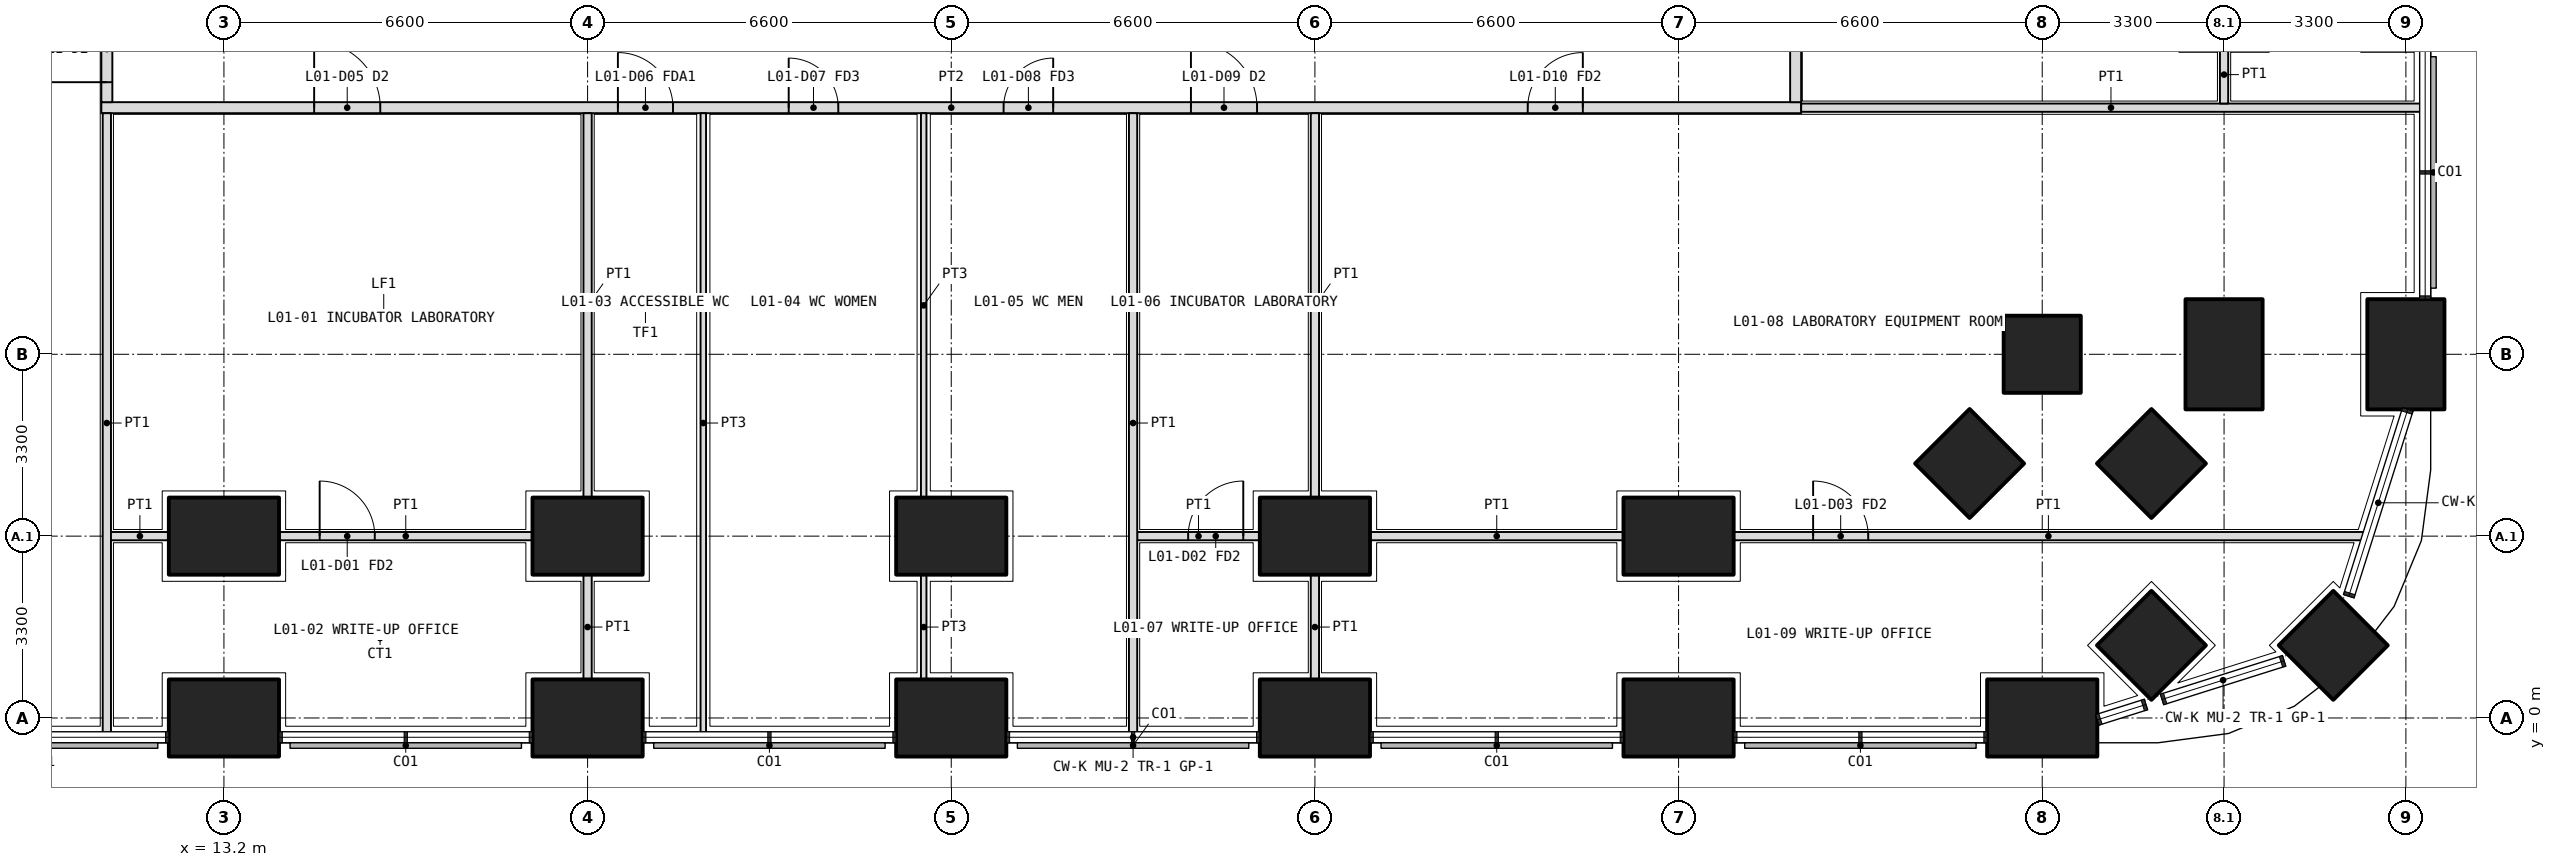
"""IFC4 building model, lengths in metres.
Left out: names, types, materials, properties, quantities, classifications, styles, units other than length and angle.
Written with IfcOpenShell. Run it as: python <this file> out.ifc"""

import sys

from ifc_helpers import new_model, si_unit, direction, frame, frame_2d, origin, origin_2d, place, context, subcontext, project, spatial, rectangle, extrude, element, fill, save


model = new_model("IFC4")
c1 = context("Model", 3, precision=1e-05, world=origin(), true_north=direction((0.0, 1.0)))
c2 = subcontext(c1, "Body", "Model", "MODEL_VIEW")
j1 = project(units=[si_unit("LENGTHUNIT", "METRE"), si_unit("PLANEANGLEUNIT", "RADIAN")], contexts=[c1])
p1 = place(None, origin())
s1 = spatial("IfcSite", under=j1, at=p1, CompositionType="ELEMENT")
p2 = place(p1, origin())
s2 = spatial("IfcBuilding", under=s1, at=p2, CompositionType="ELEMENT")
p3 = place(p2, frame((0.0, 0.0, 7.2)))
s3 = spatial("IfcBuildingStorey", under=s2, at=p3, CompositionType="ELEMENT", Elevation=7.2)
p4 = place(p3, frame((51.482, 1.318, 0.0), z_axis=(0.0, 0.0, 1.0), x_axis=(0.707106781187, 0.707106781187, 0.0)))
e1 = element("IfcColumn", 1, at=p4, inside=s3, PredefinedType="COLUMN", context=c2, shape_type="SweptSolid", body=[
    extrude(rectangle(XDim=1.4, YDim=1.4, at=origin_2d()), origin(), (0.0, 0.0, 1.0), 5.4),
])
for number, where, z_axis, x_axis in (
    (2, (13.2, 0.0, 0.0), (0.0, 0.0, 1.0), (1.0, 0.0, 0.0)),
    (3, (19.8, 0.0, 0.0), (0.0, 0.0, 1.0), (1.0, 0.0, 0.0)),
    (4, (26.4, 0.0, 0.0), (0.0, 0.0, 1.0), (1.0, 0.0, 0.0)),
    (5, (33.0, 0.0, 0.0), (0.0, 0.0, 1.0), (1.0, 0.0, 0.0)),
    (6, (39.6, 0.0, 0.0), (0.0, 0.0, 1.0), (1.0, 0.0, 0.0)),
    (7, (46.2, 0.0, 0.0), (0.0, 0.0, 1.0), (1.0, 0.0, 0.0)),
    (8, (52.8, 6.6, 0.0), (0.0, 0.0, 1.0), (0.0, 1.0, 0.0)),
):
    element("IfcColumn", number, at=place(p3, frame(where, z_axis=z_axis, x_axis=x_axis)), inside=s3, PredefinedType="COLUMN", context=c2, shape_type="SweptSolid", body=[
        extrude(rectangle(XDim=2.0, YDim=1.4, at=origin_2d()), origin(), (0.0, 0.0, 1.0), 5.4),
    ])
for number, where, z_axis, x_axis in (
    (9, (46.2, 6.6, 0.0), (0.0, 0.0, 1.0), (1.0, 0.0, 0.0)),
    (10, (48.182, 1.318, 0.0), (0.0, 0.0, 1.0), (0.707, 0.707, 0.0)),
):
    element("IfcColumn", number, at=place(p3, frame(where, z_axis=z_axis, x_axis=x_axis)), inside=s3, PredefinedType="COLUMN", context=c2, shape_type="SweptSolid", body=[
        extrude(rectangle(XDim=1.4, YDim=1.4, at=origin_2d()), origin(), (0.0, 0.0, 1.0), 5.4),
    ])
p5 = place(p3, frame((49.5, 6.6, 0.0), z_axis=(0.0, 0.0, 1.0), x_axis=(0.0, 1.0, 0.0)))
e11 = element("IfcColumn", 11, at=p5, inside=s3, PredefinedType="COLUMN", context=c2, shape_type="SweptSolid", body=[
    extrude(rectangle(XDim=2.0, YDim=1.4, at=origin_2d()), origin(), (0.0, 0.0, 1.0), 5.4),
])
p6 = place(p3, frame((48.182, 4.618, 0.0), z_axis=(0.0, 0.0, 1.0), x_axis=(0.707106781187, 0.707106781187, 0.0)))
e12 = element("IfcColumn", 12, at=p6, inside=s3, PredefinedType="COLUMN", context=c2, shape_type="SweptSolid", body=[
    extrude(rectangle(XDim=1.4, YDim=1.4, at=origin_2d()), origin(), (0.0, 0.0, 1.0), 5.4),
])
for number, where, z_axis, x_axis in (
    (13, (13.2, 3.3, 0.0), (0.0, 0.0, 1.0), (1.0, 0.0, 0.0)),
    (14, (19.8, 3.3, 0.0), (0.0, 0.0, 1.0), (1.0, 0.0, 0.0)),
    (15, (26.4, 3.3, 0.0), (0.0, 0.0, 1.0), (1.0, 0.0, 0.0)),
    (16, (33.0, 3.3, 0.0), (0.0, 0.0, 1.0), (1.0, 0.0, 0.0)),
    (17, (39.6, 3.3, 0.0), (0.0, 0.0, 1.0), (1.0, 0.0, 0.0)),
):
    element("IfcColumn", number, at=place(p3, frame(where, z_axis=z_axis, x_axis=x_axis)), inside=s3, PredefinedType="COLUMN", context=c2, shape_type="SweptSolid", body=[
        extrude(rectangle(XDim=2.0, YDim=1.4, at=origin_2d()), origin(), (0.0, 0.0, 1.0), 5.4),
    ])
p7 = place(p3, frame((44.882, 4.618, 0.0), z_axis=(0.0, 0.0, 1.0), x_axis=(0.707106781187, 0.707106781187, 0.0)))
e18 = element("IfcColumn", 18, at=p7, inside=s3, PredefinedType="COLUMN", context=c2, shape_type="SweptSolid", body=[
    extrude(rectangle(XDim=1.4, YDim=1.4, at=origin_2d()), origin(), (0.0, 0.0, 1.0), 5.4),
])
p8 = place(p3, frame((10.975, 11.075, 0.0), z_axis=(0.0, 0.0, 1.0), x_axis=(1.0, 0.0, 0.0)))
e19 = element("IfcWall", 19, at=p8, inside=s3, PredefinedType="PARTITIONING", context=c2, shape_type="SweptSolid", body=[
    extrude(rectangle(XDim=30.85, YDim=0.2, at=frame_2d((15.425, 0.0))), origin(), (0.0, 0.0, 1.0), 4.05),
])
p9 = place(p8, frame((3.863, 0.0, 0.0)))
e20 = element("IfcOpeningElement", 20, at=p9, cuts=e19, PredefinedType="OPENING", context=c2, shape_type="SweptSolid", body=[
    extrude(rectangle(XDim=1.2, YDim=2.1, at=frame_2d((0.6, 1.05))), frame((0.0, 0.11, 0.0), z_axis=(0.0, -1.0, 0.0), x_axis=(1.0, 0.0, 0.0)), (0.0, 0.0, 1.0), 0.22),
])
p10 = place(p8, frame((9.375, 0.0, 0.0)))
e21 = element("IfcOpeningElement", 21, at=p10, cuts=e19, PredefinedType="OPENING", context=c2, shape_type="SweptSolid", body=[
    extrude(rectangle(XDim=1.0, YDim=2.1, at=frame_2d((0.5, 1.05))), frame((0.0, 0.11, 0.0), z_axis=(0.0, -1.0, 0.0), x_axis=(1.0, 0.0, 0.0)), (0.0, 0.0, 1.0), 0.22),
])
p11 = place(p8, frame((12.475, 0.0, 0.0)))
e22 = element("IfcOpeningElement", 22, at=p11, cuts=e19, PredefinedType="OPENING", context=c2, shape_type="SweptSolid", body=[
    extrude(rectangle(XDim=0.9, YDim=2.1, at=frame_2d((0.45, 1.05))), frame((0.0, 0.11, 0.0), z_axis=(0.0, -1.0, 0.0), x_axis=(1.0, 0.0, 0.0)), (0.0, 0.0, 1.0), 0.22),
])
p12 = place(p8, frame((16.375, 0.0, 0.0)))
e23 = element("IfcOpeningElement", 23, at=p12, cuts=e19, PredefinedType="OPENING", context=c2, shape_type="SweptSolid", body=[
    extrude(rectangle(XDim=0.9, YDim=2.1, at=frame_2d((0.45, 1.05))), frame((0.0, 0.11, 0.0), z_axis=(0.0, -1.0, 0.0), x_axis=(1.0, 0.0, 0.0)), (0.0, 0.0, 1.0), 0.22),
])
p13 = place(p8, frame((19.775, 0.0, 0.0)))
e24 = element("IfcOpeningElement", 24, at=p13, cuts=e19, PredefinedType="OPENING", context=c2, shape_type="SweptSolid", body=[
    extrude(rectangle(XDim=1.2, YDim=2.1, at=frame_2d((0.6, 1.05))), frame((0.0, 0.11, 0.0), z_axis=(0.0, -1.0, 0.0), x_axis=(1.0, 0.0, 0.0)), (0.0, 0.0, 1.0), 0.22),
])
p14 = place(p8, frame((25.887, 0.0, 0.0)))
e25 = element("IfcOpeningElement", 25, at=p14, cuts=e19, PredefinedType="OPENING", context=c2, shape_type="SweptSolid", body=[
    extrude(rectangle(XDim=1.0, YDim=2.1, at=frame_2d((0.5, 1.05))), frame((0.0, 0.11, 0.0), z_axis=(0.0, -1.0, 0.0), x_axis=(1.0, 0.0, 0.0)), (0.0, 0.0, 1.0), 0.22),
])
p15 = place(p3, frame((11.075, 11.175, 0.0), z_axis=(0.0, 0.0, 1.0), x_axis=(0.0, 1.0, 0.0)))
e26 = element("IfcWall", 26, at=p15, inside=s3, PredefinedType="PARTITIONING", context=c2, shape_type="SweptSolid", body=[
    extrude(rectangle(XDim=2.025, YDim=0.2, at=frame_2d((1.012, 0.0))), origin(), (0.0, 0.0, 1.0), 4.05),
])
p16 = place(p15, frame((0.363, 0.0, 0.0)))
e27 = element("IfcOpeningElement", 27, at=p16, cuts=e26, PredefinedType="OPENING", context=c2, shape_type="SweptSolid", body=[
    extrude(rectangle(XDim=1.2, YDim=2.1, at=frame_2d((0.6, 1.05))), frame((0.0, 0.11, 0.0), z_axis=(0.0, -1.0, 0.0), x_axis=(1.0, 0.0, 0.0)), (0.0, 0.0, 1.0), 0.22),
])
p17 = place(p3, frame((41.725, 11.175, 0.0), z_axis=(0.0, 0.0, 1.0), x_axis=(0.0, 1.0, 0.0)))
e28 = element("IfcWall", 28, at=p17, inside=s3, PredefinedType="PARTITIONING", context=c2, shape_type="SweptSolid", body=[
    extrude(rectangle(XDim=23.85, YDim=0.2, at=frame_2d((11.925, 0.0))), origin(), (0.0, 0.0, 1.0), 4.05),
])
p18 = place(p17, frame((3.663, 0.0, 0.0)))
e29 = element("IfcOpeningElement", 29, at=p18, cuts=e28, PredefinedType="OPENING", context=c2, shape_type="SweptSolid", body=[
    extrude(rectangle(XDim=1.2, YDim=2.1, at=frame_2d((0.6, 1.05))), frame((0.0, 0.11, 0.0), z_axis=(0.0, -1.0, 0.0), x_axis=(1.0, 0.0, 0.0)), (0.0, 0.0, 1.0), 0.22),
])
p19 = place(p17, frame((9.625, 0.0, 0.0)))
e30 = element("IfcOpeningElement", 30, at=p19, cuts=e28, PredefinedType="OPENING", context=c2, shape_type="SweptSolid", body=[
    extrude(rectangle(XDim=1.0, YDim=2.1, at=frame_2d((0.5, 1.05))), frame((0.0, 0.11, 0.0), z_axis=(0.0, -1.0, 0.0), x_axis=(1.0, 0.0, 0.0)), (0.0, 0.0, 1.0), 0.22),
])
p20 = place(p17, frame((12.975, 0.0, 0.0)))
e31 = element("IfcOpeningElement", 31, at=p20, cuts=e28, PredefinedType="OPENING", context=c2, shape_type="SweptSolid", body=[
    extrude(rectangle(XDim=0.9, YDim=2.1, at=frame_2d((0.45, 1.05))), frame((0.0, 0.11, 0.0), z_axis=(0.0, -1.0, 0.0), x_axis=(1.0, 0.0, 0.0)), (0.0, 0.0, 1.0), 0.22),
])
p21 = place(p17, frame((18.025, 0.0, 0.0)))
e32 = element("IfcOpeningElement", 32, at=p21, cuts=e28, PredefinedType="OPENING", context=c2, shape_type="SweptSolid", body=[
    extrude(rectangle(XDim=1.0, YDim=2.1, at=frame_2d((0.5, 1.05))), frame((0.0, 0.11, 0.0), z_axis=(0.0, -1.0, 0.0), x_axis=(1.0, 0.0, 0.0)), (0.0, 0.0, 1.0), 0.22),
])
p22 = place(p17, frame((22.387, 0.0, 0.0)))
e33 = element("IfcOpeningElement", 33, at=p22, cuts=e28, PredefinedType="OPENING", context=c2, shape_type="SweptSolid", body=[
    extrude(rectangle(XDim=1.0, YDim=2.1, at=frame_2d((0.5, 1.05))), frame((0.0, 0.11, 0.0), z_axis=(0.0, -1.0, 0.0), x_axis=(1.0, 0.0, 0.0)), (0.0, 0.0, 1.0), 0.22),
])
for number, where, z_axis, x_axis in (
    (34, (11.075, -0.27, 0.0), (0.0, 0.0, 1.0), (0.0, 1.0, 0.0)),
    (35, (53.07, 11.075, 0.0), (0.0, 0.0, 1.0), (-1.0, 0.0, 0.0)),
):
    element("IfcWall", number, at=place(p3, frame(where, z_axis=z_axis, x_axis=x_axis)), inside=s3, PredefinedType="PARTITIONING", context=c2, shape_type="SweptSolid", body=[
        extrude(rectangle(XDim=11.245, YDim=0.15, at=frame_2d((5.623, 0.0))), origin(), (0.0, 0.0, 1.0), 3.9),
    ])
p23 = place(p3, frame((11.15, 3.3, 0.0), z_axis=(0.0, 0.0, 1.0), x_axis=(1.0, 0.0, 0.0)))
e36 = element("IfcWall", 36, at=p23, inside=s3, PredefinedType="PARTITIONING", context=c2, shape_type="SweptSolid", body=[
    extrude(rectangle(XDim=1.05, YDim=0.15, at=frame_2d((0.525, 0.0))), origin(), (0.0, 0.0, 1.0), 5.1),
])
p24 = place(p3, frame((14.2, 3.3, 0.0), z_axis=(0.0, 0.0, 1.0), x_axis=(1.0, 0.0, 0.0)))
e37 = element("IfcWall", 37, at=p24, inside=s3, PredefinedType="PARTITIONING", context=c2, shape_type="SweptSolid", body=[
    extrude(rectangle(XDim=4.6, YDim=0.15, at=frame_2d((2.3, 0.0))), origin(), (0.0, 0.0, 1.0), 5.1),
])
p25 = place(p24, frame((0.738, 0.0, 0.0)))
e38 = element("IfcOpeningElement", 38, at=p25, cuts=e37, PredefinedType="OPENING", context=c2, shape_type="SweptSolid", body=[
    extrude(rectangle(XDim=1.0, YDim=2.1, at=frame_2d((0.5, 1.05))), frame((0.0, 0.085, 0.0), z_axis=(0.0, -1.0, 0.0), x_axis=(1.0, 0.0, 0.0)), (0.0, 0.0, 1.0), 0.17),
])
p26 = place(p3, frame((29.775, 3.3, 0.0), z_axis=(0.0, 0.0, 1.0), x_axis=(1.0, 0.0, 0.0)))
e39 = element("IfcWall", 39, at=p26, inside=s3, PredefinedType="PARTITIONING", context=c2, shape_type="SweptSolid", body=[
    extrude(rectangle(XDim=2.225, YDim=0.15, at=frame_2d((1.113, 0.0))), origin(), (0.0, 0.0, 1.0), 5.1),
])
p27 = place(p26, frame((0.925, 0.0, 0.0)))
e40 = element("IfcOpeningElement", 40, at=p27, cuts=e39, PredefinedType="OPENING", context=c2, shape_type="SweptSolid", body=[
    extrude(rectangle(XDim=1.0, YDim=2.1, at=frame_2d((0.5, 1.05))), frame((0.0, 0.085, 0.0), z_axis=(0.0, -1.0, 0.0), x_axis=(1.0, 0.0, 0.0)), (0.0, 0.0, 1.0), 0.17),
])
p28 = place(p3, frame((34.0, 3.3, 0.0), z_axis=(0.0, 0.0, 1.0), x_axis=(1.0, 0.0, 0.0)))
e41 = element("IfcWall", 41, at=p28, inside=s3, PredefinedType="PARTITIONING", context=c2, shape_type="SweptSolid", body=[
    extrude(rectangle(XDim=4.6, YDim=0.15, at=frame_2d((2.3, 0.0))), origin(), (0.0, 0.0, 1.0), 5.1),
])
p29 = place(p3, frame((40.6, 3.3, 0.0), z_axis=(0.0, 0.0, 1.0), x_axis=(1.0, 0.0, 0.0)))
e42 = element("IfcWall", 42, at=p29, inside=s3, PredefinedType="PARTITIONING", context=c2, shape_type="SweptSolid", body=[
    extrude(rectangle(XDim=11.424, YDim=0.15, at=frame_2d((5.712, 0.0))), origin(), (0.0, 0.0, 1.0), 3.9),
])
p30 = place(p29, frame((1.442, 0.0, 0.0)))
e43 = element("IfcOpeningElement", 43, at=p30, cuts=e42, PredefinedType="OPENING", context=c2, shape_type="SweptSolid", body=[
    extrude(rectangle(XDim=1.0, YDim=2.1, at=frame_2d((0.5, 1.05))), frame((0.0, 0.085, 0.0), z_axis=(0.0, -1.0, 0.0), x_axis=(1.0, 0.0, 0.0)), (0.0, 0.0, 1.0), 0.17),
])
p31 = place(p3, frame((21.9, -0.27, 0.0), z_axis=(0.0, 0.0, 1.0), x_axis=(0.0, 1.0, 0.0)))
e44 = element("IfcWall", 44, at=p31, inside=s3, PredefinedType="PARTITIONING", context=c2, shape_type="SweptSolid", body=[
    extrude(rectangle(XDim=11.245, YDim=0.1, at=frame_2d((5.623, 0.0))), origin(), (0.0, 0.0, 1.0), 3.9),
])
p32 = place(p3, frame((25.9, 0.7, 0.0), z_axis=(0.0, 0.0, 1.0), x_axis=(0.0, 1.0, 0.0)))
e45 = element("IfcWall", 45, at=p32, inside=s3, PredefinedType="PARTITIONING", context=c2, shape_type="SweptSolid", body=[
    extrude(rectangle(XDim=1.9, YDim=0.1, at=frame_2d((0.95, 0.0))), origin(), (0.0, 0.0, 1.0), 4.05),
])
p33 = place(p3, frame((25.9, 4.0, 0.0), z_axis=(0.0, 0.0, 1.0), x_axis=(0.0, 1.0, 0.0)))
e46 = element("IfcWall", 46, at=p33, inside=s3, PredefinedType="PARTITIONING", context=c2, shape_type="SweptSolid", body=[
    extrude(rectangle(XDim=6.975, YDim=0.1, at=frame_2d((3.488, 0.0))), origin(), (0.0, 0.0, 1.0), 4.05),
])
p34 = place(p3, frame((29.7, -0.27, 0.0), z_axis=(0.0, 0.0, 1.0), x_axis=(0.0, 1.0, 0.0)))
e47 = element("IfcWall", 47, at=p34, inside=s3, PredefinedType="PARTITIONING", context=c2, shape_type="SweptSolid", body=[
    extrude(rectangle(XDim=11.245, YDim=0.15, at=frame_2d((5.623, 0.0))), origin(), (0.0, 0.0, 1.0), 3.9),
])
p35 = place(p3, frame((19.8, 0.7, 0.0), z_axis=(0.0, 0.0, 1.0), x_axis=(0.0, 1.0, 0.0)))
e48 = element("IfcWall", 48, at=p35, inside=s3, PredefinedType="PARTITIONING", context=c2, shape_type="SweptSolid", body=[
    extrude(rectangle(XDim=1.9, YDim=0.15, at=frame_2d((0.95, 0.0))), origin(), (0.0, 0.0, 1.0), 4.05),
])
p36 = place(p3, frame((19.8, 4.0, 0.0), z_axis=(0.0, 0.0, 1.0), x_axis=(0.0, 1.0, 0.0)))
e49 = element("IfcWall", 49, at=p36, inside=s3, PredefinedType="PARTITIONING", context=c2, shape_type="SweptSolid", body=[
    extrude(rectangle(XDim=6.975, YDim=0.15, at=frame_2d((3.488, 0.0))), origin(), (0.0, 0.0, 1.0), 4.05),
])
p37 = place(p3, frame((33.0, 0.7, 0.0), z_axis=(0.0, 0.0, 1.0), x_axis=(0.0, 1.0, 0.0)))
e50 = element("IfcWall", 50, at=p37, inside=s3, PredefinedType="PARTITIONING", context=c2, shape_type="SweptSolid", body=[
    extrude(rectangle(XDim=1.9, YDim=0.15, at=frame_2d((0.95, 0.0))), origin(), (0.0, 0.0, 1.0), 4.05),
])
p38 = place(p3, frame((33.0, 4.0, 0.0), z_axis=(0.0, 0.0, 1.0), x_axis=(0.0, 1.0, 0.0)))
e51 = element("IfcWall", 51, at=p38, inside=s3, PredefinedType="PARTITIONING", context=c2, shape_type="SweptSolid", body=[
    extrude(rectangle(XDim=6.975, YDim=0.15, at=frame_2d((3.488, 0.0))), origin(), (0.0, 0.0, 1.0), 4.05),
])
p39 = place(p3, frame((49.5, 11.15, 0.0), z_axis=(0.0, 0.0, 1.0), x_axis=(0.0, 1.0, 0.0)))
e52 = element("IfcWall", 52, at=p39, inside=s3, PredefinedType="PARTITIONING", context=c2, shape_type="SweptSolid", body=[
    extrude(rectangle(XDim=1.05, YDim=0.15, at=frame_2d((0.525, 0.0))), origin(), (0.0, 0.0, 1.0), 5.1),
])
p40 = place(p9, origin())
e53 = element("IfcDoor", 53, at=p40, inside=s3, OperationType="DOUBLE_DOOR_SINGLE_SWING", PredefinedType="DOOR", context=c2, shape_type="SweptSolid", body=[
    extrude(rectangle(XDim=1.2, YDim=2.1, at=frame_2d((0.6, 1.05))), frame((0.0, 0.025, 0.0), z_axis=(0.0, -1.0, 0.0), x_axis=(1.0, 0.0, 0.0)), (0.0, 0.0, 1.0), 0.05),
])
fill(e20, e53)
p41 = place(p25, origin())
e54 = element("IfcDoor", 54, at=p41, inside=s3, OperationType="SINGLE_SWING_LEFT", PredefinedType="DOOR", context=c2, shape_type="SweptSolid", body=[
    extrude(rectangle(XDim=1.0, YDim=2.1, at=frame_2d((0.5, 1.05))), frame((0.0, 0.025, 0.0), z_axis=(0.0, -1.0, 0.0), x_axis=(1.0, 0.0, 0.0)), (0.0, 0.0, 1.0), 0.05),
])
fill(e38, e54)
p42 = place(p10, origin())
e55 = element("IfcDoor", 55, at=p42, inside=s3, OperationType="SINGLE_SWING_LEFT", PredefinedType="DOOR", context=c2, shape_type="SweptSolid", body=[
    extrude(rectangle(XDim=1.0, YDim=2.1, at=frame_2d((0.5, 1.05))), frame((0.0, 0.025, 0.0), z_axis=(0.0, -1.0, 0.0), x_axis=(1.0, 0.0, 0.0)), (0.0, 0.0, 1.0), 0.05),
])
fill(e21, e55)
p43 = place(p11, origin())
e56 = element("IfcDoor", 56, at=p43, inside=s3, OperationType="SINGLE_SWING_LEFT", PredefinedType="DOOR", context=c2, shape_type="SweptSolid", body=[
    extrude(rectangle(XDim=0.9, YDim=2.1, at=frame_2d((0.45, 1.05))), frame((0.0, 0.025, 0.0), z_axis=(0.0, -1.0, 0.0), x_axis=(1.0, 0.0, 0.0)), (0.0, 0.0, 1.0), 0.05),
])
fill(e22, e56)
p44 = place(p12, origin())
e57 = element("IfcDoor", 57, at=p44, inside=s3, OperationType="SINGLE_SWING_RIGHT", PredefinedType="DOOR", context=c2, shape_type="SweptSolid", body=[
    extrude(rectangle(XDim=0.9, YDim=2.1, at=frame_2d((0.45, 1.05))), frame((0.0, 0.025, 0.0), z_axis=(0.0, -1.0, 0.0), x_axis=(1.0, 0.0, 0.0)), (0.0, 0.0, 1.0), 0.05),
])
fill(e23, e57)
p45 = place(p13, origin())
e58 = element("IfcDoor", 58, at=p45, inside=s3, OperationType="DOUBLE_DOOR_SINGLE_SWING", PredefinedType="DOOR", context=c2, shape_type="SweptSolid", body=[
    extrude(rectangle(XDim=1.2, YDim=2.1, at=frame_2d((0.6, 1.05))), frame((0.0, 0.025, 0.0), z_axis=(0.0, -1.0, 0.0), x_axis=(1.0, 0.0, 0.0)), (0.0, 0.0, 1.0), 0.05),
])
fill(e24, e58)
p46 = place(p27, origin())
e59 = element("IfcDoor", 59, at=p46, inside=s3, OperationType="SINGLE_SWING_RIGHT", PredefinedType="DOOR", context=c2, shape_type="SweptSolid", body=[
    extrude(rectangle(XDim=1.0, YDim=2.1, at=frame_2d((0.5, 1.05))), frame((0.0, 0.025, 0.0), z_axis=(0.0, -1.0, 0.0), x_axis=(1.0, 0.0, 0.0)), (0.0, 0.0, 1.0), 0.05),
])
fill(e40, e59)
p47 = place(p14, origin())
e60 = element("IfcDoor", 60, at=p47, inside=s3, OperationType="SINGLE_SWING_RIGHT", PredefinedType="DOOR", context=c2, shape_type="SweptSolid", body=[
    extrude(rectangle(XDim=1.0, YDim=2.1, at=frame_2d((0.5, 1.05))), frame((0.0, 0.025, 0.0), z_axis=(0.0, -1.0, 0.0), x_axis=(1.0, 0.0, 0.0)), (0.0, 0.0, 1.0), 0.05),
])
fill(e25, e60)
p48 = place(p30, origin())
e61 = element("IfcDoor", 61, at=p48, inside=s3, OperationType="SINGLE_SWING_LEFT", PredefinedType="DOOR", context=c2, shape_type="SweptSolid", body=[
    extrude(rectangle(XDim=1.0, YDim=2.1, at=frame_2d((0.5, 1.05))), frame((0.0, 0.025, 0.0), z_axis=(0.0, -1.0, 0.0), x_axis=(1.0, 0.0, 0.0)), (0.0, 0.0, 1.0), 0.05),
])
fill(e43, e61)
p49 = place(p16, origin())
e62 = element("IfcDoor", 62, at=p49, inside=s3, OperationType="DOUBLE_DOOR_SINGLE_SWING", PredefinedType="DOOR", context=c2, shape_type="SweptSolid", body=[
    extrude(rectangle(XDim=1.2, YDim=2.1, at=frame_2d((0.6, 1.05))), frame((0.0, 0.025, 0.0), z_axis=(0.0, -1.0, 0.0), x_axis=(1.0, 0.0, 0.0)), (0.0, 0.0, 1.0), 0.05),
])
fill(e27, e62)
save(model, sys.argv[1])
